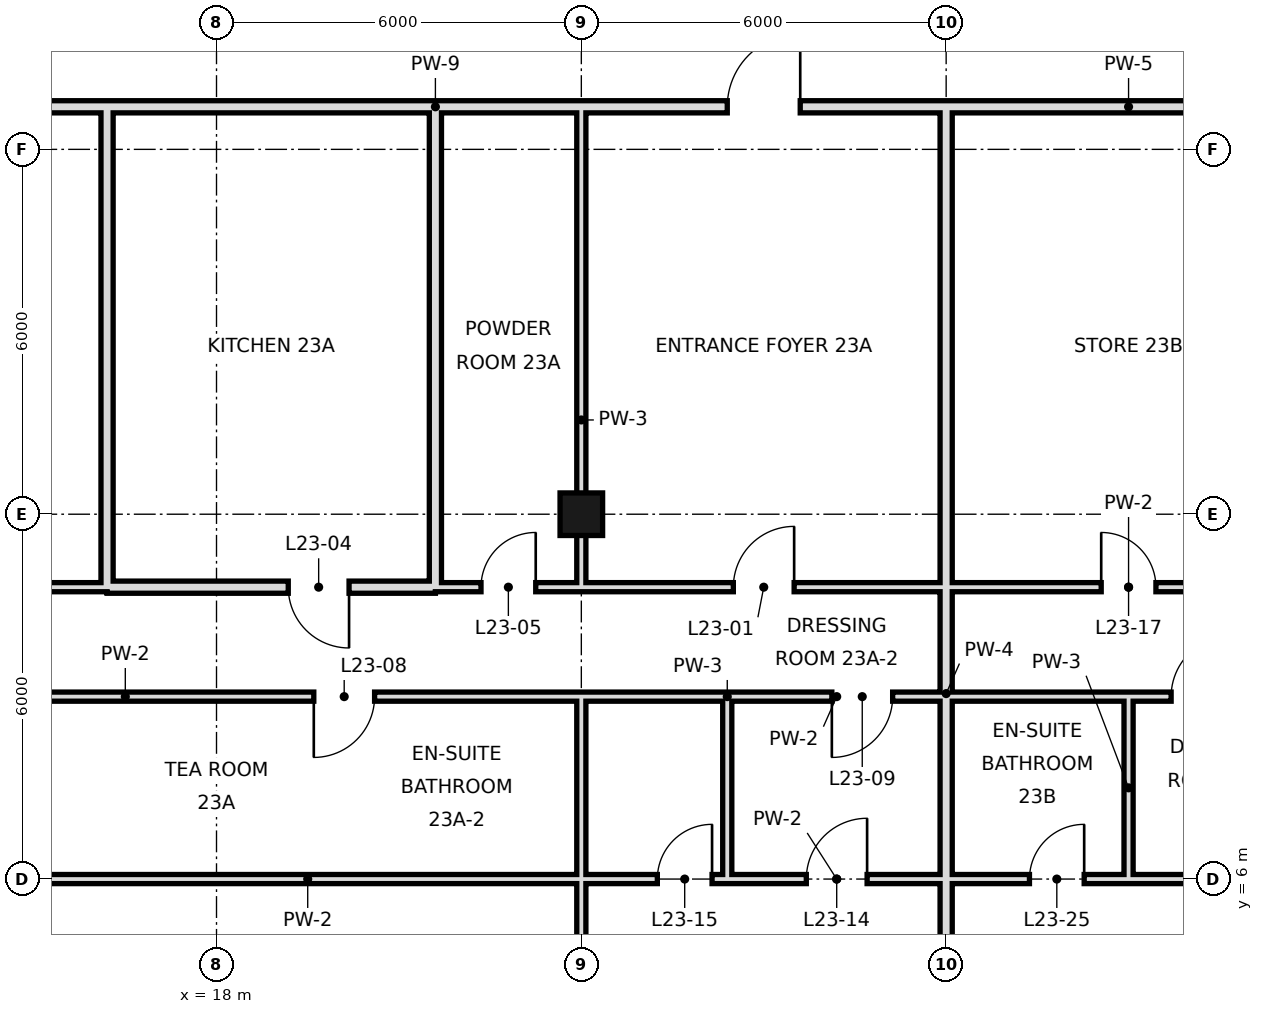
"""IFC4 building model, lengths in metres.
Left out: names, types, materials, properties, quantities, classifications, styles, units other than length and angle.
Written with IfcOpenShell. Run it as: python <this file> out.ifc"""

import sys

from ifc_helpers import new_model, si_unit, direction, frame, frame_2d, origin, origin_2d, place, context, subcontext, project, spatial, rectangle, hollow_rectangle, extrude, element, fill, save


model = new_model("IFC4")
c1 = context("Model", 3, precision=1e-05, world=origin(), true_north=direction((0.0, 1.0)))
c2 = subcontext(c1, "Body", "Model", "MODEL_VIEW")
j1 = project(units=[si_unit("LENGTHUNIT", "METRE"), si_unit("PLANEANGLEUNIT", "RADIAN")], contexts=[c1])
p1 = place(None, origin())
s1 = spatial("IfcSite", under=j1, at=p1, CompositionType="ELEMENT")
p2 = place(p1, origin())
s2 = spatial("IfcBuilding", under=s1, at=p2, CompositionType="ELEMENT")
p3 = place(p2, frame((0.0, 0.0, 107.0)))
s3 = spatial("IfcBuildingStorey", under=s2, at=p3, CompositionType="ELEMENT", Elevation=107.0)
p4 = place(p3, frame((24.0, 12.0, 0.0), z_axis=(0.0, 0.0, 1.0), x_axis=(1.0, 0.0, 0.0)))
e1 = element("IfcColumn", 1, at=p4, inside=s3, PredefinedType="COLUMN", context=c2, shape_type="SweptSolid", body=[
    extrude(hollow_rectangle(XDim=0.7, YDim=0.7, WallThickness=0.036, at=origin_2d()), origin(), (0.0, 0.0, 1.0), 3.6),
])
for number, where, z_axis, x_axis in (
    (2, (16.2, 10.8, 0.0), (0.0, 0.0, 1.0), (0.0, 1.0, 0.0)),
    (3, (21.6, 10.8, 0.0), (0.0, 0.0, 1.0), (0.0, 1.0, 0.0)),
):
    element("IfcWall", number, at=place(p3, frame(where, z_axis=z_axis, x_axis=x_axis)), inside=s3, PredefinedType="SOLIDWALL", context=c2, shape_type="SweptSolid", body=[
        extrude(rectangle(XDim=7.9, YDim=0.2, at=frame_2d((3.95, 0.0))), origin(), (0.0, 0.0, 1.0), 2.72),
    ])
p5 = place(p3, frame((24.0, 0.0, 0.0), z_axis=(0.0, 0.0, 1.0), x_axis=(0.0, 1.0, 0.0)))
e4 = element("IfcWall", 4, at=p5, inside=s3, PredefinedType="PARTITIONING", context=c2, shape_type="SweptSolid", body=[
    extrude(rectangle(XDim=6.0, YDim=0.15, at=frame_2d((3.0, 0.0))), origin(), (0.0, 0.0, 1.0), 2.72),
])
p6 = place(p3, frame((24.0, 6.0, 0.0), z_axis=(0.0, 0.0, 1.0), x_axis=(0.0, 1.0, 0.0)))
e5 = element("IfcWall", 5, at=p6, inside=s3, PredefinedType="PARTITIONING", context=c2, shape_type="SweptSolid", body=[
    extrude(rectangle(XDim=3.0, YDim=0.15, at=frame_2d((1.5, 0.0))), origin(), (0.0, 0.0, 1.0), 2.72),
])
p7 = place(p3, frame((24.0, 10.8, 0.0), z_axis=(0.0, 0.0, 1.0), x_axis=(0.0, 1.0, 0.0)))
e6 = element("IfcWall", 6, at=p7, inside=s3, PredefinedType="PARTITIONING", context=c2, shape_type="SweptSolid", body=[
    extrude(rectangle(XDim=7.9, YDim=0.15, at=frame_2d((3.95, 0.0))), origin(), (0.0, 0.0, 1.0), 2.72),
])
p8 = place(p3, frame((26.4, 6.0, 0.0), z_axis=(0.0, 0.0, 1.0), x_axis=(0.0, 1.0, 0.0)))
e7 = element("IfcWall", 7, at=p8, inside=s3, PredefinedType="PARTITIONING", context=c2, shape_type="SweptSolid", body=[
    extrude(rectangle(XDim=3.0, YDim=0.15, at=frame_2d((1.5, 0.0))), origin(), (0.0, 0.0, 1.0), 3.42),
])
p9 = place(p3, frame((30.0, -0.6, 0.0), z_axis=(0.0, 0.0, 1.0), x_axis=(0.0, 1.0, 0.0)))
e8 = element("IfcWall", 8, at=p9, inside=s3, PredefinedType="SOLIDWALL", context=c2, shape_type="SweptSolid", body=[
    extrude(rectangle(XDim=19.3, YDim=0.2, at=frame_2d((9.65, 0.0))), origin(), (0.0, 0.0, 1.0), 2.72),
])
p10 = place(p3, frame((33.0, 6.0, 0.0), z_axis=(0.0, 0.0, 1.0), x_axis=(0.0, 1.0, 0.0)))
e9 = element("IfcWall", 9, at=p10, inside=s3, PredefinedType="PARTITIONING", context=c2, shape_type="SweptSolid", body=[
    extrude(rectangle(XDim=3.0, YDim=0.15, at=frame_2d((1.5, 0.0))), origin(), (0.0, 0.0, 1.0), 3.42),
])
p11 = place(p3, frame((16.2, 10.8, 0.0), z_axis=(0.0, 0.0, 1.0), x_axis=(1.0, 0.0, 0.0)))
e10 = element("IfcWall", 10, at=p11, inside=s3, PredefinedType="SOLIDWALL", context=c2, shape_type="SweptSolid", body=[
    extrude(rectangle(XDim=5.4, YDim=0.2, at=frame_2d((2.7, 0.0))), origin(), (0.0, 0.0, 1.0), 2.72),
])
p12 = place(p11, frame((2.98, 0.0, 0.0)))
e11 = element("IfcOpeningElement", 11, at=p12, cuts=e10, PredefinedType="OPENING", context=c2, shape_type="SweptSolid", body=[
    extrude(rectangle(XDim=1.0, YDim=2.4, at=frame_2d((0.5, 1.2))), frame((0.0, 0.11, 0.0), z_axis=(0.0, -1.0, 0.0), x_axis=(1.0, 0.0, 0.0)), (0.0, 0.0, 1.0), 0.22),
])
p13 = place(p3, frame((-6.6, 10.8, 0.0), z_axis=(0.0, 0.0, 1.0), x_axis=(1.0, 0.0, 0.0)))
e12 = element("IfcWall", 12, at=p13, inside=s3, PredefinedType="PARTITIONING", context=c2, shape_type="SweptSolid", body=[
    extrude(rectangle(XDim=22.8, YDim=0.15, at=frame_2d((11.4, 0.0))), origin(), (0.0, 0.0, 1.0), 3.42),
])
p14 = place(p13, frame((3.64, 0.0, 0.0)))
e13 = element("IfcOpeningElement", 13, at=p14, cuts=e12, PredefinedType="OPENING", context=c2, shape_type="SweptSolid", body=[
    extrude(rectangle(XDim=1.0, YDim=2.4, at=frame_2d((0.5, 1.2))), frame((0.0, 0.085, 0.0), z_axis=(0.0, -1.0, 0.0), x_axis=(1.0, 0.0, 0.0)), (0.0, 0.0, 1.0), 0.17),
])
p15 = place(p13, frame((16.6, 0.0, 0.0)))
e14 = element("IfcOpeningElement", 14, at=p15, cuts=e12, PredefinedType="OPENING", context=c2, shape_type="SweptSolid", body=[
    extrude(rectangle(XDim=1.0, YDim=2.4, at=frame_2d((0.5, 1.2))), frame((0.0, 0.085, 0.0), z_axis=(0.0, -1.0, 0.0), x_axis=(1.0, 0.0, 0.0)), (0.0, 0.0, 1.0), 0.17),
])
p16 = place(p3, frame((24.0, 10.8, 0.0), z_axis=(0.0, 0.0, 1.0), x_axis=(1.0, 0.0, 0.0)))
e15 = element("IfcWall", 15, at=p16, inside=s3, PredefinedType="PARTITIONING", context=c2, shape_type="SweptSolid", body=[
    extrude(rectangle(XDim=18.0, YDim=0.15, at=frame_2d((9.0, 0.0))), origin(), (0.0, 0.0, 1.0), 3.42),
])
p17 = place(p16, frame((2.5, 0.0, 0.0)))
e16 = element("IfcOpeningElement", 16, at=p17, cuts=e15, PredefinedType="OPENING", context=c2, shape_type="SweptSolid", body=[
    extrude(rectangle(XDim=1.0, YDim=2.4, at=frame_2d((0.5, 1.2))), frame((0.0, 0.085, 0.0), z_axis=(0.0, -1.0, 0.0), x_axis=(1.0, 0.0, 0.0)), (0.0, 0.0, 1.0), 0.17),
])
p18 = place(p16, frame((15.4, 0.0, 0.0)))
e17 = element("IfcOpeningElement", 17, at=p18, cuts=e15, PredefinedType="OPENING", context=c2, shape_type="SweptSolid", body=[
    extrude(rectangle(XDim=1.0, YDim=2.4, at=frame_2d((0.5, 1.2))), frame((0.0, 0.085, 0.0), z_axis=(0.0, -1.0, 0.0), x_axis=(1.0, 0.0, 0.0)), (0.0, 0.0, 1.0), 0.17),
])
p19 = place(p16, frame((8.55, 0.0, 0.0)))
e18 = element("IfcOpeningElement", 18, at=p19, cuts=e15, PredefinedType="OPENING", context=c2, shape_type="SweptSolid", body=[
    extrude(rectangle(XDim=0.9, YDim=2.1, at=frame_2d((0.45, 1.05))), frame((0.0, 0.085, 0.0), z_axis=(0.0, -1.0, 0.0), x_axis=(1.0, 0.0, 0.0)), (0.0, 0.0, 1.0), 0.17),
])
p20 = place(p3, frame((21.6, 10.8, 0.0), z_axis=(0.0, 0.0, 1.0), x_axis=(1.0, 0.0, 0.0)))
e19 = element("IfcWall", 19, at=p20, inside=s3, PredefinedType="PARTITIONING", context=c2, shape_type="SweptSolid", body=[
    extrude(rectangle(XDim=2.4, YDim=0.15, at=frame_2d((1.2, 0.0))), origin(), (0.0, 0.0, 1.0), 3.42),
])
p21 = place(p20, frame((0.75, 0.0, 0.0)))
e20 = element("IfcOpeningElement", 20, at=p21, cuts=e19, PredefinedType="OPENING", context=c2, shape_type="SweptSolid", body=[
    extrude(rectangle(XDim=0.9, YDim=2.4, at=frame_2d((0.45, 1.2))), frame((0.0, 0.085, 0.0), z_axis=(0.0, -1.0, 0.0), x_axis=(1.0, 0.0, 0.0)), (0.0, 0.0, 1.0), 0.17),
])
p22 = place(p3, frame((3.1, 18.7, 0.0), z_axis=(0.0, 0.0, 1.0), x_axis=(1.0, 0.0, 0.0)))
e21 = element("IfcWall", 21, at=p22, inside=s3, PredefinedType="SOLIDWALL", context=c2, shape_type="SweptSolid", body=[
    extrude(rectangle(XDim=13.1, YDim=0.2, at=frame_2d((6.55, 0.0))), origin(), (0.0, 0.0, 1.0), 2.72),
])
p23 = place(p3, frame((21.6, 18.7, 0.0), z_axis=(0.0, 0.0, 1.0), x_axis=(1.0, 0.0, 0.0)))
e22 = element("IfcWall", 22, at=p23, inside=s3, PredefinedType="SOLIDWALL", context=c2, shape_type="SweptSolid", body=[
    extrude(rectangle(XDim=22.8, YDim=0.2, at=frame_2d((11.4, 0.0))), origin(), (0.0, 0.0, 1.0), 2.72),
])
p24 = place(p23, frame((4.8, 0.0, 0.0)))
e23 = element("IfcOpeningElement", 23, at=p24, cuts=e22, PredefinedType="OPENING", context=c2, shape_type="SweptSolid", body=[
    extrude(rectangle(XDim=1.2, YDim=2.4, at=frame_2d((0.6, 1.2))), frame((0.0, 0.11, 0.0), z_axis=(0.0, -1.0, 0.0), x_axis=(1.0, 0.0, 0.0)), (0.0, 0.0, 1.0), 0.22),
])
p25 = place(p23, frame((16.8, 0.0, 0.0)))
e24 = element("IfcOpeningElement", 24, at=p25, cuts=e22, PredefinedType="OPENING", context=c2, shape_type="SweptSolid", body=[
    extrude(rectangle(XDim=1.2, YDim=2.4, at=frame_2d((0.6, 1.2))), frame((0.0, 0.11, 0.0), z_axis=(0.0, -1.0, 0.0), x_axis=(1.0, 0.0, 0.0)), (0.0, 0.0, 1.0), 0.22),
])
p26 = place(p3, frame((16.2, 18.7, 0.0), z_axis=(0.0, 0.0, 1.0), x_axis=(1.0, 0.0, 0.0)))
e25 = element("IfcWall", 25, at=p26, inside=s3, PredefinedType="SOLIDWALL", context=c2, shape_type="SweptSolid", body=[
    extrude(rectangle(XDim=5.4, YDim=0.2, at=frame_2d((2.7, 0.0))), origin(), (0.0, 0.0, 1.0), 2.72),
])
p27 = place(p3, frame((9.0, 6.0, 0.0), z_axis=(0.0, 0.0, 1.0), x_axis=(1.0, 0.0, 0.0)))
e26 = element("IfcWall", 26, at=p27, inside=s3, PredefinedType="PARTITIONING", context=c2, shape_type="SweptSolid", body=[
    extrude(rectangle(XDim=15.0, YDim=0.15, at=frame_2d((7.5, 0.0))), origin(), (0.0, 0.0, 1.0), 2.97),
])
p28 = place(p27, frame((1.3, 0.0, 0.0)))
e27 = element("IfcOpeningElement", 27, at=p28, cuts=e26, PredefinedType="OPENING", context=c2, shape_type="SweptSolid", body=[
    extrude(rectangle(XDim=1.0, YDim=2.4, at=frame_2d((0.5, 1.2))), frame((0.0, 0.085, 0.0), z_axis=(0.0, -1.0, 0.0), x_axis=(1.0, 0.0, 0.0)), (0.0, 0.0, 1.0), 0.17),
])
p29 = place(p27, frame((3.25, 0.0, 0.0)))
e28 = element("IfcOpeningElement", 28, at=p29, cuts=e26, PredefinedType="OPENING", context=c2, shape_type="SweptSolid", body=[
    extrude(rectangle(XDim=1.0, YDim=2.4, at=frame_2d((0.5, 1.2))), frame((0.0, 0.085, 0.0), z_axis=(0.0, -1.0, 0.0), x_axis=(1.0, 0.0, 0.0)), (0.0, 0.0, 1.0), 0.17),
])
p30 = place(p3, frame((26.4, 6.0, 0.0), z_axis=(0.0, 0.0, 1.0), x_axis=(1.0, 0.0, 0.0)))
e29 = element("IfcWall", 29, at=p30, inside=s3, PredefinedType="PARTITIONING", context=c2, shape_type="SweptSolid", body=[
    extrude(rectangle(XDim=3.6, YDim=0.15, at=frame_2d((1.8, 0.0))), origin(), (0.0, 0.0, 1.0), 2.97),
])
p31 = place(p30, frame((1.3, 0.0, 0.0)))
e30 = element("IfcOpeningElement", 30, at=p31, cuts=e29, PredefinedType="OPENING", context=c2, shape_type="SweptSolid", body=[
    extrude(rectangle(XDim=1.0, YDim=2.4, at=frame_2d((0.5, 1.2))), frame((0.0, 0.085, 0.0), z_axis=(0.0, -1.0, 0.0), x_axis=(1.0, 0.0, 0.0)), (0.0, 0.0, 1.0), 0.17),
])
p32 = place(p3, frame((33.0, 6.0, 0.0), z_axis=(0.0, 0.0, 1.0), x_axis=(1.0, 0.0, 0.0)))
e31 = element("IfcWall", 31, at=p32, inside=s3, PredefinedType="PARTITIONING", context=c2, shape_type="SweptSolid", body=[
    extrude(rectangle(XDim=6.6, YDim=0.15, at=frame_2d((3.3, 0.0))), origin(), (0.0, 0.0, 1.0), 2.97),
])
p33 = place(p32, frame((1.3, 0.0, 0.0)))
e32 = element("IfcOpeningElement", 32, at=p33, cuts=e31, PredefinedType="OPENING", context=c2, shape_type="SweptSolid", body=[
    extrude(rectangle(XDim=1.0, YDim=2.4, at=frame_2d((0.5, 1.2))), frame((0.0, 0.085, 0.0), z_axis=(0.0, -1.0, 0.0), x_axis=(1.0, 0.0, 0.0)), (0.0, 0.0, 1.0), 0.17),
])
p34 = place(p32, frame((4.3, 0.0, 0.0)))
e33 = element("IfcOpeningElement", 33, at=p34, cuts=e31, PredefinedType="OPENING", context=c2, shape_type="SweptSolid", body=[
    extrude(rectangle(XDim=1.0, YDim=2.4, at=frame_2d((0.5, 1.2))), frame((0.0, 0.085, 0.0), z_axis=(0.0, -1.0, 0.0), x_axis=(1.0, 0.0, 0.0)), (0.0, 0.0, 1.0), 0.17),
])
p35 = place(p3, frame((24.0, 6.0, 0.0), z_axis=(0.0, 0.0, 1.0), x_axis=(1.0, 0.0, 0.0)))
e34 = element("IfcWall", 34, at=p35, inside=s3, PredefinedType="PARTITIONING", context=c2, shape_type="SweptSolid", body=[
    extrude(rectangle(XDim=2.4, YDim=0.15, at=frame_2d((1.2, 0.0))), origin(), (0.0, 0.0, 1.0), 2.97),
])
p36 = place(p35, frame((1.25, 0.0, 0.0)))
e35 = element("IfcOpeningElement", 35, at=p36, cuts=e34, PredefinedType="OPENING", context=c2, shape_type="SweptSolid", body=[
    extrude(rectangle(XDim=0.9, YDim=2.4, at=frame_2d((0.45, 1.2))), frame((0.0, 0.085, 0.0), z_axis=(0.0, -1.0, 0.0), x_axis=(1.0, 0.0, 0.0)), (0.0, 0.0, 1.0), 0.17),
])
p37 = place(p3, frame((30.0, 6.0, 0.0), z_axis=(0.0, 0.0, 1.0), x_axis=(1.0, 0.0, 0.0)))
e36 = element("IfcWall", 36, at=p37, inside=s3, PredefinedType="PARTITIONING", context=c2, shape_type="SweptSolid", body=[
    extrude(rectangle(XDim=3.0, YDim=0.15, at=frame_2d((1.5, 0.0))), origin(), (0.0, 0.0, 1.0), 2.97),
])
p38 = place(p37, frame((1.37, 0.0, 0.0)))
e37 = element("IfcOpeningElement", 37, at=p38, cuts=e36, PredefinedType="OPENING", context=c2, shape_type="SweptSolid", body=[
    extrude(rectangle(XDim=0.9, YDim=2.4, at=frame_2d((0.45, 1.2))), frame((0.0, 0.085, 0.0), z_axis=(0.0, -1.0, 0.0), x_axis=(1.0, 0.0, 0.0)), (0.0, 0.0, 1.0), 0.17),
])
p39 = place(p3, frame((9.0, 9.0, 0.0), z_axis=(0.0, 0.0, 1.0), x_axis=(1.0, 0.0, 0.0)))
e38 = element("IfcWall", 38, at=p39, inside=s3, PredefinedType="PARTITIONING", context=c2, shape_type="SweptSolid", body=[
    extrude(rectangle(XDim=15.0, YDim=0.15, at=frame_2d((7.5, 0.0))), origin(), (0.0, 0.0, 1.0), 3.42),
])
p40 = place(p39, frame((1.0, 0.0, 0.0)))
e39 = element("IfcOpeningElement", 39, at=p40, cuts=e38, PredefinedType="OPENING", context=c2, shape_type="SweptSolid", body=[
    extrude(rectangle(XDim=1.0, YDim=2.4, at=frame_2d((0.5, 1.2))), frame((0.0, 0.085, 0.0), z_axis=(0.0, -1.0, 0.0), x_axis=(1.0, 0.0, 0.0)), (0.0, 0.0, 1.0), 0.17),
])
p41 = place(p39, frame((10.6, 0.0, 0.0)))
e40 = element("IfcOpeningElement", 40, at=p41, cuts=e38, PredefinedType="OPENING", context=c2, shape_type="SweptSolid", body=[
    extrude(rectangle(XDim=1.0, YDim=2.4, at=frame_2d((0.5, 1.2))), frame((0.0, 0.085, 0.0), z_axis=(0.0, -1.0, 0.0), x_axis=(1.0, 0.0, 0.0)), (0.0, 0.0, 1.0), 0.17),
])
p42 = place(p3, frame((26.4, 9.0, 0.0), z_axis=(0.0, 0.0, 1.0), x_axis=(1.0, 0.0, 0.0)))
e41 = element("IfcWall", 41, at=p42, inside=s3, PredefinedType="PARTITIONING", context=c2, shape_type="SweptSolid", body=[
    extrude(rectangle(XDim=3.6, YDim=0.15, at=frame_2d((1.8, 0.0))), origin(), (0.0, 0.0, 1.0), 3.42),
])
p43 = place(p42, frame((1.72, 0.0, 0.0)))
e42 = element("IfcOpeningElement", 42, at=p43, cuts=e41, PredefinedType="OPENING", context=c2, shape_type="SweptSolid", body=[
    extrude(rectangle(XDim=1.0, YDim=2.4, at=frame_2d((0.5, 1.2))), frame((0.0, 0.085, 0.0), z_axis=(0.0, -1.0, 0.0), x_axis=(1.0, 0.0, 0.0)), (0.0, 0.0, 1.0), 0.17),
])
p44 = place(p3, frame((33.0, 9.0, 0.0), z_axis=(0.0, 0.0, 1.0), x_axis=(1.0, 0.0, 0.0)))
e43 = element("IfcWall", 43, at=p44, inside=s3, PredefinedType="PARTITIONING", context=c2, shape_type="SweptSolid", body=[
    extrude(rectangle(XDim=6.6, YDim=0.15, at=frame_2d((3.3, 0.0))), origin(), (0.0, 0.0, 1.0), 3.42),
])
p45 = place(p44, frame((0.7, 0.0, 0.0)))
e44 = element("IfcOpeningElement", 44, at=p45, cuts=e43, PredefinedType="OPENING", context=c2, shape_type="SweptSolid", body=[
    extrude(rectangle(XDim=1.0, YDim=2.4, at=frame_2d((0.5, 1.2))), frame((0.0, 0.085, 0.0), z_axis=(0.0, -1.0, 0.0), x_axis=(1.0, 0.0, 0.0)), (0.0, 0.0, 1.0), 0.17),
])
p46 = place(p44, frame((4.3, 0.0, 0.0)))
e45 = element("IfcOpeningElement", 45, at=p46, cuts=e43, PredefinedType="OPENING", context=c2, shape_type="SweptSolid", body=[
    extrude(rectangle(XDim=1.0, YDim=2.4, at=frame_2d((0.5, 1.2))), frame((0.0, 0.085, 0.0), z_axis=(0.0, -1.0, 0.0), x_axis=(1.0, 0.0, 0.0)), (0.0, 0.0, 1.0), 0.17),
])
p47 = place(p3, frame((24.0, 9.0, 0.0), z_axis=(0.0, 0.0, 1.0), x_axis=(1.0, 0.0, 0.0)))
e46 = element("IfcWall", 46, at=p47, inside=s3, PredefinedType="PARTITIONING", context=c2, shape_type="SweptSolid", body=[
    extrude(rectangle(XDim=2.4, YDim=0.15, at=frame_2d((1.2, 0.0))), origin(), (0.0, 0.0, 1.0), 3.42),
])
p48 = place(p3, frame((30.0, 9.0, 0.0), z_axis=(0.0, 0.0, 1.0), x_axis=(1.0, 0.0, 0.0)))
e47 = element("IfcWall", 47, at=p48, inside=s3, PredefinedType="PARTITIONING", context=c2, shape_type="SweptSolid", body=[
    extrude(rectangle(XDim=3.0, YDim=0.15, at=frame_2d((1.5, 0.0))), origin(), (0.0, 0.0, 1.0), 3.42),
])
p49 = place(p17, frame((1.0, 0.0, 0.0), z_axis=(0.0, 0.0, 1.0), x_axis=(-1.0, 0.0, 0.0)))
e48 = element("IfcDoor", 48, at=p49, inside=s3, OperationType="SINGLE_SWING_LEFT", PredefinedType="DOOR", context=c2, shape_type="SweptSolid", body=[
    extrude(rectangle(XDim=1.0, YDim=2.4, at=frame_2d((0.5, 1.2))), frame((0.0, 0.025, 0.0), z_axis=(0.0, -1.0, 0.0), x_axis=(1.0, 0.0, 0.0)), (0.0, 0.0, 1.0), 0.05),
])
fill(e16, e48)
p50 = place(p12, origin())
e49 = element("IfcDoor", 49, at=p50, inside=s3, OperationType="SINGLE_SWING_RIGHT", PredefinedType="DOOR", context=c2, shape_type="SweptSolid", body=[
    extrude(rectangle(XDim=1.0, YDim=2.4, at=frame_2d((0.5, 1.2))), frame((0.0, 0.025, 0.0), z_axis=(0.0, -1.0, 0.0), x_axis=(1.0, 0.0, 0.0)), (0.0, 0.0, 1.0), 0.05),
])
fill(e11, e49)
p51 = place(p21, frame((0.9, 0.0, 0.0), z_axis=(0.0, 0.0, 1.0), x_axis=(-1.0, 0.0, 0.0)))
e50 = element("IfcDoor", 50, at=p51, inside=s3, OperationType="SINGLE_SWING_LEFT", PredefinedType="DOOR", context=c2, shape_type="SweptSolid", body=[
    extrude(rectangle(XDim=0.9, YDim=2.4, at=frame_2d((0.45, 1.2))), frame((0.0, 0.025, 0.0), z_axis=(0.0, -1.0, 0.0), x_axis=(1.0, 0.0, 0.0)), (0.0, 0.0, 1.0), 0.05),
])
fill(e20, e50)
p52 = place(p41, frame((1.0, 0.0, 0.0), z_axis=(0.0, 0.0, 1.0), x_axis=(-1.0, 0.0, 0.0)))
e51 = element("IfcDoor", 51, at=p52, inside=s3, OperationType="SINGLE_SWING_RIGHT", PredefinedType="DOOR", context=c2, shape_type="SweptSolid", body=[
    extrude(rectangle(XDim=1.0, YDim=2.4, at=frame_2d((0.5, 1.2))), frame((0.0, 0.025, 0.0), z_axis=(0.0, -1.0, 0.0), x_axis=(1.0, 0.0, 0.0)), (0.0, 0.0, 1.0), 0.05),
])
fill(e40, e51)
p53 = place(p43, frame((1.0, 0.0, 0.0), z_axis=(0.0, 0.0, 1.0), x_axis=(-1.0, 0.0, 0.0)))
e52 = element("IfcDoor", 52, at=p53, inside=s3, OperationType="SINGLE_SWING_RIGHT", PredefinedType="DOOR", context=c2, shape_type="SweptSolid", body=[
    extrude(rectangle(XDim=1.0, YDim=2.4, at=frame_2d((0.5, 1.2))), frame((0.0, 0.025, 0.0), z_axis=(0.0, -1.0, 0.0), x_axis=(1.0, 0.0, 0.0)), (0.0, 0.0, 1.0), 0.05),
])
fill(e42, e52)
p54 = place(p31, frame((1.0, 0.0, 0.0), z_axis=(0.0, 0.0, 1.0), x_axis=(-1.0, 0.0, 0.0)))
e53 = element("IfcDoor", 53, at=p54, inside=s3, OperationType="SINGLE_SWING_LEFT", PredefinedType="DOOR", context=c2, shape_type="SweptSolid", body=[
    extrude(rectangle(XDim=1.0, YDim=2.4, at=frame_2d((0.5, 1.2))), frame((0.0, 0.025, 0.0), z_axis=(0.0, -1.0, 0.0), x_axis=(1.0, 0.0, 0.0)), (0.0, 0.0, 1.0), 0.05),
])
fill(e30, e53)
p55 = place(p36, frame((0.9, 0.0, 0.0), z_axis=(0.0, 0.0, 1.0), x_axis=(-1.0, 0.0, 0.0)))
e54 = element("IfcDoor", 54, at=p55, inside=s3, OperationType="SINGLE_SWING_LEFT", PredefinedType="DOOR", context=c2, shape_type="SweptSolid", body=[
    extrude(rectangle(XDim=0.9, YDim=2.4, at=frame_2d((0.45, 1.2))), frame((0.0, 0.025, 0.0), z_axis=(0.0, -1.0, 0.0), x_axis=(1.0, 0.0, 0.0)), (0.0, 0.0, 1.0), 0.05),
])
fill(e35, e54)
p56 = place(p19, origin())
e55 = element("IfcDoor", 55, at=p56, inside=s3, OperationType="SINGLE_SWING_LEFT", PredefinedType="DOOR", context=c2, shape_type="SweptSolid", body=[
    extrude(rectangle(XDim=0.9, YDim=2.1, at=frame_2d((0.45, 1.05))), frame((0.0, 0.025, 0.0), z_axis=(0.0, -1.0, 0.0), x_axis=(1.0, 0.0, 0.0)), (0.0, 0.0, 1.0), 0.05),
])
fill(e18, e55)
p57 = place(p45, frame((1.0, 0.0, 0.0), z_axis=(0.0, 0.0, 1.0), x_axis=(-1.0, 0.0, 0.0)))
e56 = element("IfcDoor", 56, at=p57, inside=s3, OperationType="SINGLE_SWING_LEFT", PredefinedType="DOOR", context=c2, shape_type="SweptSolid", body=[
    extrude(rectangle(XDim=1.0, YDim=2.4, at=frame_2d((0.5, 1.2))), frame((0.0, 0.025, 0.0), z_axis=(0.0, -1.0, 0.0), x_axis=(1.0, 0.0, 0.0)), (0.0, 0.0, 1.0), 0.05),
])
fill(e44, e56)
p58 = place(p38, frame((0.9, 0.0, 0.0), z_axis=(0.0, 0.0, 1.0), x_axis=(-1.0, 0.0, 0.0)))
e57 = element("IfcDoor", 57, at=p58, inside=s3, OperationType="SINGLE_SWING_LEFT", PredefinedType="DOOR", context=c2, shape_type="SweptSolid", body=[
    extrude(rectangle(XDim=0.9, YDim=2.4, at=frame_2d((0.45, 1.2))), frame((0.0, 0.025, 0.0), z_axis=(0.0, -1.0, 0.0), x_axis=(1.0, 0.0, 0.0)), (0.0, 0.0, 1.0), 0.05),
])
fill(e37, e57)
p59 = place(p24, frame((1.2, 0.0, 0.0), z_axis=(0.0, 0.0, 1.0), x_axis=(-1.0, 0.0, 0.0)))
e58 = element("IfcDoor", 58, at=p59, inside=s3, OperationType="SINGLE_SWING_LEFT", PredefinedType="DOOR", context=c2, shape_type="SweptSolid", body=[
    extrude(rectangle(XDim=1.2, YDim=2.4, at=frame_2d((0.6, 1.2))), frame((0.0, 0.025, 0.0), z_axis=(0.0, -1.0, 0.0), x_axis=(1.0, 0.0, 0.0)), (0.0, 0.0, 1.0), 0.05),
])
fill(e23, e58)
save(model, sys.argv[1])
